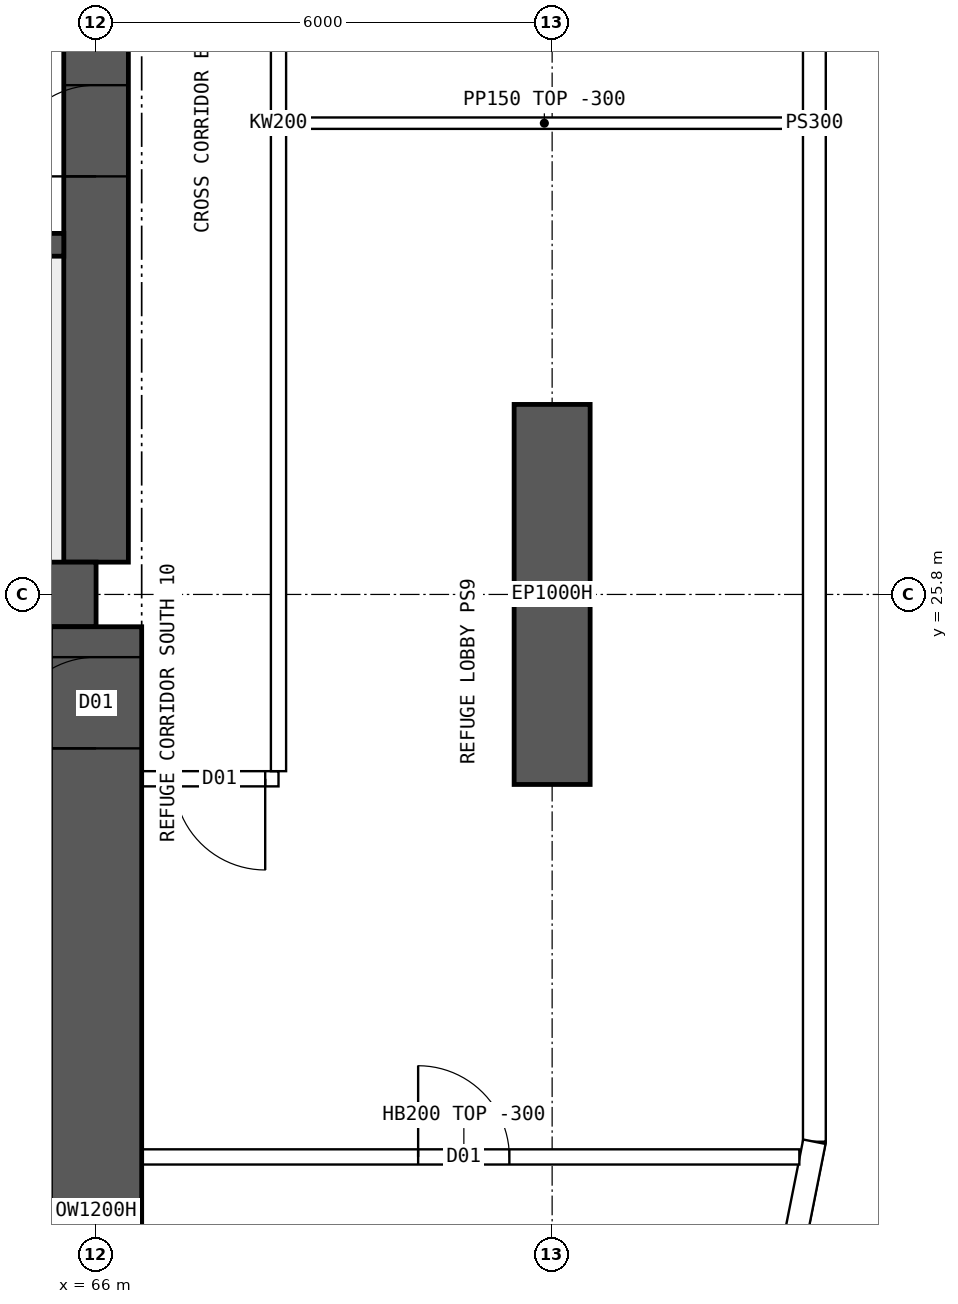
"""IFC4 building model, lengths in metres.
Left out: names, types, materials, properties, quantities, classifications, styles, units other than length and angle.
Written with IfcOpenShell. Run it as: python <this file> out.ifc"""

import sys

from ifc_helpers import new_model, si_unit, direction, frame, frame_2d, origin, place, context, subcontext, project, spatial, polyline, rectangle, outline, extrude, clip, halfspace, element, fill, save


model = new_model("IFC4")
c1 = context("Model", 3, precision=1e-05, world=origin(), true_north=direction((0.0, 1.0)))
c2 = subcontext(c1, "Body", "Model", "MODEL_VIEW")
j1 = project(units=[si_unit("LENGTHUNIT", "METRE"), si_unit("PLANEANGLEUNIT", "RADIAN")], contexts=[c1])
p1 = place(None, origin())
s1 = spatial("IfcSite", under=j1, at=p1, CompositionType="ELEMENT")
p2 = place(p1, origin())
s2 = spatial("IfcBuilding", under=s1, at=p2, CompositionType="ELEMENT")
p3 = place(p2, frame((0.0, 0.0, 201.1)))
s3 = spatial("IfcBuildingStorey", under=s2, at=p3, CompositionType="ELEMENT", Elevation=201.1)
p4 = place(p3, frame((72.0, 23.3, 0.0), z_axis=(0.0, 0.0, 1.0), x_axis=(0.0, 1.0, 0.0)))
e1 = element("IfcWall", 1, at=p4, inside=s3, PredefinedType="SHEAR", context=c2, shape_type="SweptSolid", body=[
    extrude(rectangle(XDim=5.0, YDim=1.0, at=frame_2d((2.5, 0.0))), origin(), (0.0, 0.0, 1.0), 7.2),
])
p5 = place(p3, frame((18.0, 25.8, 0.0), z_axis=(0.0, 0.0, 1.0), x_axis=(1.0, 0.0, 0.0)))
e2 = element("IfcWall", 2, at=p5, inside=s3, PredefinedType="SHEAR", context=c2, shape_type="SweptSolid", body=[
    extrude(rectangle(XDim=48.0, YDim=0.85, at=frame_2d((24.0, 0.0))), origin(), (0.0, 0.0, 1.0), 7.2),
])
p6 = place(p3, frame((66.0, 26.225, 0.0), z_axis=(0.0, 0.0, 1.0), x_axis=(0.0, 1.0, 0.0)))
e3 = element("IfcWall", 3, at=p6, inside=s3, PredefinedType="SHEAR", context=c2, shape_type="SweptSolid", body=[
    extrude(rectangle(XDim=11.55, YDim=0.85, at=frame_2d((5.775, 0.0))), origin(), (0.0, 0.0, 1.0), 7.2),
])
p7 = place(p6, frame((5.075, 0.0, 0.0)))
e4 = element("IfcOpeningElement", 4, at=p7, cuts=e3, PredefinedType="OPENING", context=c2, shape_type="SweptSolid", body=[
    extrude(rectangle(XDim=1.2, YDim=2.1, at=frame_2d((0.6, 1.05))), frame((0.0, 0.435, 0.0), z_axis=(0.0, -1.0, 0.0), x_axis=(1.0, 0.0, 0.0)), (0.0, 0.0, 1.0), 0.87),
])
p8 = place(p3, frame((18.425, 30.4, 0.0), z_axis=(0.0, 0.0, 1.0), x_axis=(1.0, 0.0, 0.0)))
e5 = element("IfcWall", 5, at=p8, inside=s3, PredefinedType="SHEAR", context=c2, shape_type="SweptSolid", body=[
    extrude(rectangle(XDim=47.15, YDim=0.3, at=frame_2d((23.575, 0.0))), origin(), (0.0, 0.0, 1.0), 7.2),
])
p9 = place(p8, frame((0.4, 0.0, 0.0)))
e6 = element("IfcOpeningElement", 6, at=p9, cuts=e5, PredefinedType="OPENING", context=c2, shape_type="SweptSolid", body=[
    extrude(rectangle(XDim=1.0, YDim=2.1, at=frame_2d((0.5, 1.05))), frame((0.0, 0.16, 0.0), z_axis=(0.0, -1.0, 0.0), x_axis=(1.0, 0.0, 0.0)), (0.0, 0.0, 1.0), 0.32),
])
p10 = place(p8, frame((45.75, 0.0, 0.0)))
e7 = element("IfcOpeningElement", 7, at=p10, cuts=e5, PredefinedType="OPENING", context=c2, shape_type="SweptSolid", body=[
    extrude(rectangle(XDim=1.0, YDim=2.1, at=frame_2d((0.5, 1.05))), frame((0.0, 0.16, 0.0), z_axis=(0.0, -1.0, 0.0), x_axis=(1.0, 0.0, 0.0)), (0.0, 0.0, 1.0), 0.32),
])
p11 = place(p8, frame((18.9, 0.0, 0.0)))
e8 = element("IfcOpeningElement", 8, at=p11, cuts=e5, PredefinedType="OPENING", context=c2, shape_type="SweptSolid", body=[
    extrude(rectangle(XDim=0.9, YDim=2.1, at=frame_2d((0.45, 1.05))), frame((0.0, 0.16, 0.0), z_axis=(0.0, -1.0, 0.0), x_axis=(1.0, 0.0, 0.0)), (0.0, 0.0, 1.0), 0.32),
])
p12 = place(p8, frame((30.192, 0.0, 0.0)))
e9 = element("IfcOpeningElement", 9, at=p12, cuts=e5, PredefinedType="OPENING", context=c2, shape_type="SweptSolid", body=[
    extrude(rectangle(XDim=1.1, YDim=2.1, at=frame_2d((0.55, 1.05))), frame((0.0, 0.16, 0.0), z_axis=(0.0, -1.0, 0.0), x_axis=(1.0, 0.0, 0.0)), (0.0, 0.0, 1.0), 0.32),
])
p13 = place(p8, frame((33.725, 0.0, 0.0)))
e10 = element("IfcOpeningElement", 10, at=p13, cuts=e5, PredefinedType="OPENING", context=c2, shape_type="SweptSolid", body=[
    extrude(rectangle(XDim=1.1, YDim=2.1, at=frame_2d((0.55, 1.05))), frame((0.0, 0.16, 0.0), z_axis=(0.0, -1.0, 0.0), x_axis=(1.0, 0.0, 0.0)), (0.0, 0.0, 1.0), 0.32),
])
p14 = place(p8, frame((37.258, 0.0, 0.0)))
e11 = element("IfcOpeningElement", 11, at=p14, cuts=e5, PredefinedType="OPENING", context=c2, shape_type="SweptSolid", body=[
    extrude(rectangle(XDim=1.1, YDim=2.1, at=frame_2d((0.55, 1.05))), frame((0.0, 0.16, 0.0), z_axis=(0.0, -1.0, 0.0), x_axis=(1.0, 0.0, 0.0)), (0.0, 0.0, 1.0), 0.32),
])
p15 = place(p3, frame((66.0, 10.0, 0.0), z_axis=(0.0, 0.0, 1.0), x_axis=(0.0, 1.0, 0.0)))
e12 = element("IfcWall", 12, at=p15, inside=s3, PredefinedType="SHEAR", context=c2, shape_type="SweptSolid", body=[
    extrude(rectangle(XDim=15.375, YDim=1.2, at=frame_2d((7.688, 0.0))), origin(), (0.0, 0.0, 1.0), 7.2),
])
p16 = place(p15, frame((13.775, 0.0, 0.0)))
e13 = element("IfcOpeningElement", 13, at=p16, cuts=e12, PredefinedType="OPENING", context=c2, shape_type="SweptSolid", body=[
    extrude(rectangle(XDim=1.2, YDim=2.1, at=frame_2d((0.6, 1.05))), frame((0.0, 0.61, 0.0), z_axis=(0.0, -1.0, 0.0), x_axis=(1.0, 0.0, 0.0)), (0.0, 0.0, 1.0), 1.22),
])
p17 = place(p15, frame((3.95, 0.0, 0.0)))
e14 = element("IfcOpeningElement", 14, at=p17, cuts=e12, PredefinedType="OPENING", context=c2, shape_type="SweptSolid", body=[
    extrude(rectangle(XDim=1.2, YDim=2.1, at=frame_2d((0.6, 1.05))), frame((0.0, 0.61, 0.0), z_axis=(0.0, -1.0, 0.0), x_axis=(1.0, 0.0, 0.0)), (0.0, 0.0, 1.0), 1.22),
])
p18 = place(p3, frame((75.45, 18.6, 0.0), z_axis=(0.0, 0.0, 1.0), x_axis=(0.0, 1.0, 0.0)))
e15 = element("IfcWall", 15, at=p18, inside=s3, PredefinedType="SOLIDWALL", context=c2, shape_type="SweptSolid", body=[
    extrude(outline(polyline([(-0.015, -0.15), (26.815, -0.15), (26.785, 0.15), (0.015, 0.15), (-0.015, -0.15)])), origin(), (0.0, 0.0, 1.0), 6.9),
])
p19 = place(p3, frame((74.792, 15.29, 0.0), z_axis=(0.0, 0.0, 1.0), x_axis=(0.19508664885, 0.980786011034, 0.0)))
e16 = element("IfcWall", 16, at=p19, inside=s3, PredefinedType="SOLIDWALL", context=c2, shape_type="SweptSolid", body=[
    extrude(outline(polyline([(-0.03, -0.15), (3.39, -0.15), (3.36, 0.15), (0.03, 0.15), (-0.03, -0.15)])), origin(), (0.0, 0.0, 1.0), 6.9),
])
p20 = place(p3, frame((68.4, 23.375, 0.0), z_axis=(0.0, 0.0, 1.0), x_axis=(-1.0, 0.0, 0.0)))
e17 = element("IfcWall", 17, at=p20, inside=s3, PredefinedType="SOLIDWALL", context=c2, shape_type="SweptSolid", body=[
    extrude(rectangle(XDim=52.8, YDim=0.2, at=frame_2d((26.4, 0.0))), origin(), (0.0, 0.0, 1.0), 6.9),
])
p21 = place(p20, frame((51.0, 0.0, 0.0)))
e18 = element("IfcOpeningElement", 18, at=p21, cuts=e17, PredefinedType="OPENING", context=c2, shape_type="SweptSolid", body=[
    extrude(rectangle(XDim=1.2, YDim=2.1, at=frame_2d((0.6, 1.05))), frame((0.0, 0.11, 0.0), z_axis=(0.0, -1.0, 0.0), x_axis=(1.0, 0.0, 0.0)), (0.0, 0.0, 1.0), 0.22),
])
p22 = place(p20, frame((48.175, 0.0, 0.0)))
e19 = element("IfcOpeningElement", 19, at=p22, cuts=e17, PredefinedType="OPENING", context=c2, shape_type="SweptSolid", body=[
    extrude(rectangle(XDim=1.2, YDim=2.1, at=frame_2d((0.6, 1.05))), frame((0.0, 0.11, 0.0), z_axis=(0.0, -1.0, 0.0), x_axis=(1.0, 0.0, 0.0)), (0.0, 0.0, 1.0), 0.22),
])
p23 = place(p20, frame((42.175, 0.0, 0.0)))
e20 = element("IfcOpeningElement", 20, at=p23, cuts=e17, PredefinedType="OPENING", context=c2, shape_type="SweptSolid", body=[
    extrude(rectangle(XDim=1.2, YDim=2.1, at=frame_2d((0.6, 1.05))), frame((0.0, 0.11, 0.0), z_axis=(0.0, -1.0, 0.0), x_axis=(1.0, 0.0, 0.0)), (0.0, 0.0, 1.0), 0.22),
])
p24 = place(p20, frame((36.175, 0.0, 0.0)))
e21 = element("IfcOpeningElement", 21, at=p24, cuts=e17, PredefinedType="OPENING", context=c2, shape_type="SweptSolid", body=[
    extrude(rectangle(XDim=1.2, YDim=2.1, at=frame_2d((0.6, 1.05))), frame((0.0, 0.11, 0.0), z_axis=(0.0, -1.0, 0.0), x_axis=(1.0, 0.0, 0.0)), (0.0, 0.0, 1.0), 0.22),
])
p25 = place(p20, frame((30.175, 0.0, 0.0)))
e22 = element("IfcOpeningElement", 22, at=p25, cuts=e17, PredefinedType="OPENING", context=c2, shape_type="SweptSolid", body=[
    extrude(rectangle(XDim=1.2, YDim=2.1, at=frame_2d((0.6, 1.05))), frame((0.0, 0.11, 0.0), z_axis=(0.0, -1.0, 0.0), x_axis=(1.0, 0.0, 0.0)), (0.0, 0.0, 1.0), 0.22),
])
p26 = place(p20, frame((24.175, 0.0, 0.0)))
e23 = element("IfcOpeningElement", 23, at=p26, cuts=e17, PredefinedType="OPENING", context=c2, shape_type="SweptSolid", body=[
    extrude(rectangle(XDim=1.2, YDim=2.1, at=frame_2d((0.6, 1.05))), frame((0.0, 0.11, 0.0), z_axis=(0.0, -1.0, 0.0), x_axis=(1.0, 0.0, 0.0)), (0.0, 0.0, 1.0), 0.22),
])
p27 = place(p20, frame((18.175, 0.0, 0.0)))
e24 = element("IfcOpeningElement", 24, at=p27, cuts=e17, PredefinedType="OPENING", context=c2, shape_type="SweptSolid", body=[
    extrude(rectangle(XDim=1.2, YDim=2.1, at=frame_2d((0.6, 1.05))), frame((0.0, 0.11, 0.0), z_axis=(0.0, -1.0, 0.0), x_axis=(1.0, 0.0, 0.0)), (0.0, 0.0, 1.0), 0.22),
])
p28 = place(p20, frame((12.175, 0.0, 0.0)))
e25 = element("IfcOpeningElement", 25, at=p28, cuts=e17, PredefinedType="OPENING", context=c2, shape_type="SweptSolid", body=[
    extrude(rectangle(XDim=1.2, YDim=2.1, at=frame_2d((0.6, 1.05))), frame((0.0, 0.11, 0.0), z_axis=(0.0, -1.0, 0.0), x_axis=(1.0, 0.0, 0.0)), (0.0, 0.0, 1.0), 0.22),
])
p29 = place(p20, frame((6.175, 0.0, 0.0)))
e26 = element("IfcOpeningElement", 26, at=p29, cuts=e17, PredefinedType="OPENING", context=c2, shape_type="SweptSolid", body=[
    extrude(rectangle(XDim=1.2, YDim=2.1, at=frame_2d((0.6, 1.05))), frame((0.0, 0.11, 0.0), z_axis=(0.0, -1.0, 0.0), x_axis=(1.0, 0.0, 0.0)), (0.0, 0.0, 1.0), 0.22),
])
p30 = place(p20, frame((0.175, 0.0, 0.0)))
e27 = element("IfcOpeningElement", 27, at=p30, cuts=e17, PredefinedType="OPENING", context=c2, shape_type="SweptSolid", body=[
    extrude(rectangle(XDim=1.2, YDim=2.1, at=frame_2d((0.6, 1.05))), frame((0.0, 0.11, 0.0), z_axis=(0.0, -1.0, 0.0), x_axis=(1.0, 0.0, 0.0)), (0.0, 0.0, 1.0), 0.22),
])
p31 = place(p3, frame((68.4, 23.475, 0.0), z_axis=(0.0, 0.0, 1.0), x_axis=(0.0, 1.0, 0.0)))
e28 = element("IfcWall", 28, at=p31, inside=s3, PredefinedType="SOLIDWALL", context=c2, shape_type="SweptSolid", body=[
    extrude(rectangle(XDim=17.05, YDim=0.2, at=frame_2d((8.525, 0.0))), origin(), (0.0, 0.0, 1.0), 6.9),
])
p32 = place(p3, frame((60.425, 18.4, 0.0), z_axis=(0.0, 0.0, 1.0), x_axis=(1.0, 0.0, 0.0)))
e29 = element("IfcWall", 29, at=p32, inside=s3, PredefinedType="SOLIDWALL", context=c2, shape_type="SweptSolid", body=[
    extrude(rectangle(XDim=5.15, YDim=0.2, at=frame_2d((2.575, 0.0))), origin(), (0.0, 0.0, 1.0), 6.9),
])
p33 = place(p32, frame((1.975, 0.0, 0.0)))
e30 = element("IfcOpeningElement", 30, at=p33, cuts=e29, PredefinedType="OPENING", context=c2, shape_type="SweptSolid", body=[
    extrude(rectangle(XDim=1.2, YDim=2.1, at=frame_2d((0.6, 1.05))), frame((0.0, 0.11, 0.0), z_axis=(0.0, -1.0, 0.0), x_axis=(1.0, 0.0, 0.0)), (0.0, 0.0, 1.0), 0.22),
])
p34 = place(p3, frame((66.425, 18.4, 0.0), z_axis=(0.0, 0.0, 1.0), x_axis=(1.0, 0.0, 0.0)))
e31 = element("IfcWall", 31, at=p34, inside=s3, PredefinedType="SOLIDWALL", context=c2, shape_type="Clipping", body=[
    clip(clip(extrude(outline(polyline([(-0.03, 0.0), (8.857, 0.0), (8.857, 6.9), (5.877, 6.9), (5.875, 6.45), (5.277, 6.45), (5.275, 6.9), (-0.03, 6.9), (-0.03, 0.0)])), frame((0.0, 0.1, 0.0), z_axis=(0.0, -1.0, 0.0), x_axis=(1.0, 0.0, 0.0)), (0.0, 0.0, 1.0), 0.2), halfspace(frame((0.0, 0.0, 0.0), z_axis=(-1.0, 0.0, 0.0)), False)), halfspace(frame((8.827, 0.0, 0.0), z_axis=(0.980787601265, -0.195078653892, 0.0)), False)),
])
p35 = place(p34, frame((3.812, 0.0, 0.0)))
e32 = element("IfcOpeningElement", 32, at=p35, cuts=e31, PredefinedType="OPENING", context=c2, shape_type="SweptSolid", body=[
    extrude(rectangle(XDim=1.2, YDim=2.1, at=frame_2d((0.6, 1.05))), frame((0.0, 0.11, 0.0), z_axis=(0.0, -1.0, 0.0), x_axis=(1.0, 0.0, 0.0)), (0.0, 0.0, 1.0), 0.22),
])
p36 = place(p3, frame((68.5, 32.0, 0.0), z_axis=(0.0, 0.0, 1.0), x_axis=(1.0, 0.0, 0.0)))
e33 = element("IfcWall", 33, at=p36, inside=s3, PredefinedType="PARTITIONING", context=c2, shape_type="SweptSolid", body=[
    extrude(outline(polyline([(0.0, 0.0), (6.795, 0.0), (6.795, 6.9), (3.802, 6.9), (3.8, 6.45), (3.202, 6.45), (3.2, 6.9), (0.0, 6.9), (0.0, 0.0)])), frame((0.0, 0.075, 0.0), z_axis=(0.0, -1.0, 0.0), x_axis=(1.0, 0.0, 0.0)), (0.0, 0.0, 1.0), 0.15),
])
p37 = place(p7, origin())
e34 = element("IfcDoor", 34, at=p37, inside=s3, OperationType="SINGLE_SWING_LEFT", PredefinedType="DOOR", context=c2, shape_type="SweptSolid", body=[
    extrude(rectangle(XDim=1.2, YDim=2.1, at=frame_2d((0.6, 1.05))), frame((0.0, 0.025, 0.0), z_axis=(0.0, -1.0, 0.0), x_axis=(1.0, 0.0, 0.0)), (0.0, 0.0, 1.0), 0.05),
])
fill(e4, e34)
p38 = place(p35, origin())
e35 = element("IfcDoor", 35, at=p38, inside=s3, OperationType="SINGLE_SWING_LEFT", PredefinedType="DOOR", context=c2, shape_type="SweptSolid", body=[
    extrude(rectangle(XDim=1.2, YDim=2.1, at=frame_2d((0.6, 1.05))), frame((0.0, 0.025, 0.0), z_axis=(0.0, -1.0, 0.0), x_axis=(1.0, 0.0, 0.0)), (0.0, 0.0, 1.0), 0.05),
])
fill(e32, e35)
p39 = place(p30, origin())
e36 = element("IfcDoor", 36, at=p39, inside=s3, OperationType="SINGLE_SWING_LEFT", PredefinedType="DOOR", context=c2, shape_type="SweptSolid", body=[
    extrude(rectangle(XDim=1.2, YDim=2.1, at=frame_2d((0.6, 1.05))), frame((0.0, 0.025, 0.0), z_axis=(0.0, -1.0, 0.0), x_axis=(1.0, 0.0, 0.0)), (0.0, 0.0, 1.0), 0.05),
])
fill(e27, e36)
p40 = place(p16, origin())
e37 = element("IfcDoor", 37, at=p40, inside=s3, OperationType="SINGLE_SWING_LEFT", PredefinedType="DOOR", context=c2, shape_type="SweptSolid", body=[
    extrude(rectangle(XDim=1.2, YDim=2.1, at=frame_2d((0.6, 1.05))), frame((0.0, 0.025, 0.0), z_axis=(0.0, -1.0, 0.0), x_axis=(1.0, 0.0, 0.0)), (0.0, 0.0, 1.0), 0.05),
])
fill(e13, e37)
save(model, sys.argv[1])
